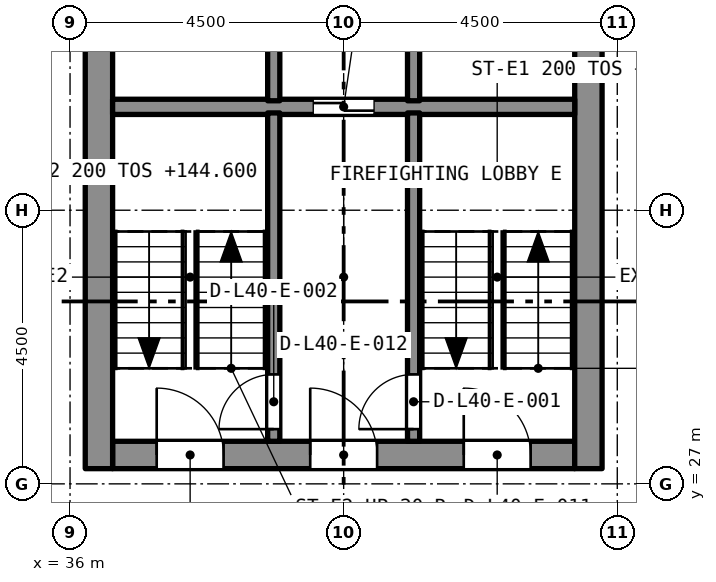
"""IFC4 building model, lengths in metres.
Left out: names, types, materials, properties, quantities, classifications, styles, units other than length and angle.
Written with IfcOpenShell. Run it as: python <this file> out.ifc"""

import sys

from ifc_helpers import new_model, si_unit, direction, frame, frame_2d, origin, place, context, subcontext, project, spatial, rectangle, extrude, element, fill, save


model = new_model("IFC4")
c1 = context("Model", 3, precision=1e-05, world=origin(), true_north=direction((0.0, 1.0)))
c2 = subcontext(c1, "Body", "Model", "MODEL_VIEW")
j1 = project(units=[si_unit("LENGTHUNIT", "METRE"), si_unit("PLANEANGLEUNIT", "RADIAN")], contexts=[c1])
p1 = place(None, origin())
s1 = spatial("IfcSite", under=j1, at=p1, CompositionType="ELEMENT")
p2 = place(p1, origin())
s2 = spatial("IfcBuilding", under=s1, at=p2, CompositionType="ELEMENT")
p3 = place(p2, frame((0.0, 0.0, 143.0)))
s3 = spatial("IfcBuildingStorey", under=s2, at=p3, CompositionType="ELEMENT", Elevation=143.0)
p4 = place(p3, frame((36.7, 27.475, 0.0), z_axis=(0.0, 0.0, 1.0), x_axis=(1.0, 0.0, 0.0)))
e1 = element("IfcWall", 1, at=p4, inside=s3, PredefinedType="SOLIDWALL", context=c2, shape_type="SweptSolid", body=[
    extrude(rectangle(XDim=7.6, YDim=0.45, at=frame_2d((3.8, 0.0))), origin(), (0.0, 0.0, 1.0), 3.2),
])
p5 = place(p4, frame((5.775, 0.0, 0.0)))
e2 = element("IfcOpeningElement", 2, at=p5, cuts=e1, PredefinedType="OPENING", context=c2, shape_type="SweptSolid", body=[
    extrude(rectangle(XDim=1.1, YDim=2.1, at=frame_2d((0.55, 1.05))), frame((0.0, 0.235, 0.0), z_axis=(0.0, -1.0, 0.0), x_axis=(1.0, 0.0, 0.0)), (0.0, 0.0, 1.0), 0.47),
])
p6 = place(p4, frame((3.25, 0.0, 0.0)))
e3 = element("IfcOpeningElement", 3, at=p6, cuts=e1, PredefinedType="OPENING", context=c2, shape_type="SweptSolid", body=[
    extrude(rectangle(XDim=1.1, YDim=2.1, at=frame_2d((0.55, 1.05))), frame((0.0, 0.235, 0.0), z_axis=(0.0, -1.0, 0.0), x_axis=(1.0, 0.0, 0.0)), (0.0, 0.0, 1.0), 0.47),
])
p7 = place(p4, frame((0.725, 0.0, 0.0)))
e4 = element("IfcOpeningElement", 4, at=p7, cuts=e1, PredefinedType="OPENING", context=c2, shape_type="SweptSolid", body=[
    extrude(rectangle(XDim=1.1, YDim=2.1, at=frame_2d((0.55, 1.05))), frame((0.0, 0.235, 0.0), z_axis=(0.0, -1.0, 0.0), x_axis=(1.0, 0.0, 0.0)), (0.0, 0.0, 1.0), 0.47),
])
p8 = place(p3, frame((36.475, 27.25, 0.0), z_axis=(0.0, 0.0, 1.0), x_axis=(0.0, 1.0, 0.0)))
e5 = element("IfcWall", 5, at=p8, inside=s3, PredefinedType="SOLIDWALL", context=c2, shape_type="SweptSolid", body=[
    extrude(rectangle(XDim=13.0, YDim=0.45, at=frame_2d((6.5, 0.0))), origin(), (0.0, 0.0, 1.0), 3.2),
])
p9 = place(p8, frame((8.7, 0.0, 0.0)))
e6 = element("IfcOpeningElement", 6, at=p9, cuts=e5, PredefinedType="OPENING", context=c2, shape_type="SweptSolid", body=[
    extrude(rectangle(XDim=1.2, YDim=2.1, at=frame_2d((0.6, 1.05))), frame((0.0, 0.235, 0.0), z_axis=(0.0, -1.0, 0.0), x_axis=(1.0, 0.0, 0.0)), (0.0, 0.0, 1.0), 0.47),
])
p10 = place(p3, frame((44.525, 27.25, 0.0), z_axis=(0.0, 0.0, 1.0), x_axis=(0.0, 1.0, 0.0)))
e7 = element("IfcWall", 7, at=p10, inside=s3, PredefinedType="SOLIDWALL", context=c2, shape_type="SweptSolid", body=[
    extrude(rectangle(XDim=13.0, YDim=0.45, at=frame_2d((6.5, 0.0))), origin(), (0.0, 0.0, 1.0), 3.2),
])
p11 = place(p10, frame((8.7, 0.0, 0.0)))
e8 = element("IfcOpeningElement", 8, at=p11, cuts=e7, PredefinedType="OPENING", context=c2, shape_type="SweptSolid", body=[
    extrude(rectangle(XDim=1.2, YDim=2.1, at=frame_2d((0.6, 1.05))), frame((0.0, 0.235, 0.0), z_axis=(0.0, -1.0, 0.0), x_axis=(1.0, 0.0, 0.0)), (0.0, 0.0, 1.0), 0.47),
])
p12 = place(p3, frame((36.7, 33.2, 0.0), z_axis=(0.0, 0.0, 1.0), x_axis=(1.0, 0.0, 0.0)))
e9 = element("IfcWall", 9, at=p12, inside=s3, PredefinedType="SOLIDWALL", context=c2, shape_type="SweptSolid", body=[
    extrude(rectangle(XDim=7.6, YDim=0.25, at=frame_2d((3.8, 0.0))), origin(), (0.0, 0.0, 1.0), 2.9),
])
p13 = place(p12, frame((3.3, 0.0, 0.0)))
e10 = element("IfcOpeningElement", 10, at=p13, cuts=e9, PredefinedType="OPENING", context=c2, shape_type="SweptSolid", body=[
    extrude(rectangle(XDim=1.0, YDim=2.1, at=frame_2d((0.5, 1.05))), frame((0.0, 0.135, 0.0), z_axis=(0.0, -1.0, 0.0), x_axis=(1.0, 0.0, 0.0)), (0.0, 0.0, 1.0), 0.27),
])
p14 = place(p3, frame((41.65, 27.7, 0.0), z_axis=(0.0, 0.0, 1.0), x_axis=(0.0, 1.0, 0.0)))
e11 = element("IfcWall", 11, at=p14, inside=s3, PredefinedType="SOLIDWALL", context=c2, shape_type="SweptSolid", body=[
    extrude(rectangle(XDim=5.4, YDim=0.2, at=frame_2d((2.7, 0.0))), origin(), (0.0, 0.0, 1.0), 2.9),
])
p15 = place(p14, frame((0.2, 0.0, 0.0)))
e12 = element("IfcOpeningElement", 12, at=p15, cuts=e11, PredefinedType="OPENING", context=c2, shape_type="SweptSolid", body=[
    extrude(rectangle(XDim=0.9, YDim=2.1, at=frame_2d((0.45, 1.05))), frame((0.0, 0.11, 0.0), z_axis=(0.0, -1.0, 0.0), x_axis=(1.0, 0.0, 0.0)), (0.0, 0.0, 1.0), 0.22),
])
p16 = place(p3, frame((39.35, 27.7, 0.0), z_axis=(0.0, 0.0, 1.0), x_axis=(0.0, 1.0, 0.0)))
e13 = element("IfcWall", 13, at=p16, inside=s3, PredefinedType="SOLIDWALL", context=c2, shape_type="SweptSolid", body=[
    extrude(rectangle(XDim=5.4, YDim=0.2, at=frame_2d((2.7, 0.0))), origin(), (0.0, 0.0, 1.0), 2.9),
])
p17 = place(p16, frame((0.2, 0.0, 0.0)))
e14 = element("IfcOpeningElement", 14, at=p17, cuts=e13, PredefinedType="OPENING", context=c2, shape_type="SweptSolid", body=[
    extrude(rectangle(XDim=0.9, YDim=2.1, at=frame_2d((0.45, 1.05))), frame((0.0, 0.11, 0.0), z_axis=(0.0, -1.0, 0.0), x_axis=(1.0, 0.0, 0.0)), (0.0, 0.0, 1.0), 0.22),
])
for number, where, z_axis, x_axis in (
    (15, (41.65, 33.3, 0.0), (0.0, 0.0, 1.0), (0.0, 1.0, 0.0)),
    (16, (39.35, 33.3, 0.0), (0.0, 0.0, 1.0), (0.0, 1.0, 0.0)),
):
    element("IfcWall", number, at=place(p3, frame(where, z_axis=z_axis, x_axis=x_axis)), inside=s3, PredefinedType="SOLIDWALL", context=c2, shape_type="SweptSolid", body=[
        extrude(rectangle(XDim=2.3, YDim=0.2, at=frame_2d((1.15, 0.0))), origin(), (0.0, 0.0, 1.0), 2.9),
    ])
p18 = place(p15, origin())
e17 = element("IfcDoor", 17, at=p18, inside=s3, OperationType="SINGLE_SWING_LEFT", PredefinedType="DOOR", context=c2, shape_type="SweptSolid", body=[
    extrude(rectangle(XDim=0.9, YDim=2.1, at=frame_2d((0.45, 1.05))), frame((0.0, 0.025, 0.0), z_axis=(0.0, -1.0, 0.0), x_axis=(1.0, 0.0, 0.0)), (0.0, 0.0, 1.0), 0.05),
])
fill(e12, e17)
p19 = place(p17, origin())
e18 = element("IfcDoor", 18, at=p19, inside=s3, OperationType="SINGLE_SWING_LEFT", PredefinedType="DOOR", context=c2, shape_type="SweptSolid", body=[
    extrude(rectangle(XDim=0.9, YDim=2.1, at=frame_2d((0.45, 1.05))), frame((0.0, 0.025, 0.0), z_axis=(0.0, -1.0, 0.0), x_axis=(1.0, 0.0, 0.0)), (0.0, 0.0, 1.0), 0.05),
])
fill(e14, e18)
p20 = place(p13, origin())
e19 = element("IfcDoor", 19, at=p20, inside=s3, OperationType="SLIDING_TO_LEFT", PredefinedType="DOOR", context=c2, shape_type="SweptSolid", body=[
    extrude(rectangle(XDim=1.0, YDim=2.1, at=frame_2d((0.5, 1.05))), frame((0.0, 0.025, 0.0), z_axis=(0.0, -1.0, 0.0), x_axis=(1.0, 0.0, 0.0)), (0.0, 0.0, 1.0), 0.05),
])
fill(e10, e19)
p21 = place(p5, origin())
e20 = element("IfcDoor", 20, at=p21, inside=s3, OperationType="SINGLE_SWING_LEFT", PredefinedType="DOOR", context=c2, shape_type="SweptSolid", body=[
    extrude(rectangle(XDim=1.1, YDim=2.1, at=frame_2d((0.55, 1.05))), frame((0.0, 0.025, 0.0), z_axis=(0.0, -1.0, 0.0), x_axis=(1.0, 0.0, 0.0)), (0.0, 0.0, 1.0), 0.05),
])
fill(e2, e20)
p22 = place(p6, origin())
e21 = element("IfcDoor", 21, at=p22, inside=s3, OperationType="SINGLE_SWING_LEFT", PredefinedType="DOOR", context=c2, shape_type="SweptSolid", body=[
    extrude(rectangle(XDim=1.1, YDim=2.1, at=frame_2d((0.55, 1.05))), frame((0.0, 0.025, 0.0), z_axis=(0.0, -1.0, 0.0), x_axis=(1.0, 0.0, 0.0)), (0.0, 0.0, 1.0), 0.05),
])
fill(e3, e21)
p23 = place(p7, origin())
e22 = element("IfcDoor", 22, at=p23, inside=s3, OperationType="SINGLE_SWING_LEFT", PredefinedType="DOOR", context=c2, shape_type="SweptSolid", body=[
    extrude(rectangle(XDim=1.1, YDim=2.1, at=frame_2d((0.55, 1.05))), frame((0.0, 0.025, 0.0), z_axis=(0.0, -1.0, 0.0), x_axis=(1.0, 0.0, 0.0)), (0.0, 0.0, 1.0), 0.05),
])
fill(e4, e22)
save(model, sys.argv[1])
